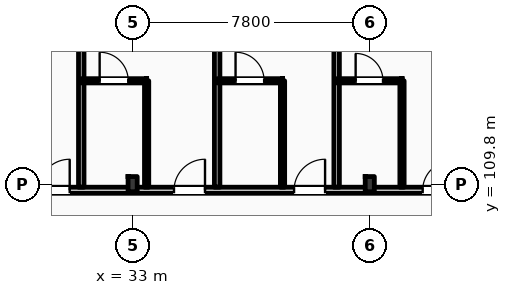
"""IFC4 building model, lengths in metres.
Left out: names, types, materials, properties, quantities, classifications, styles, units other than length and angle.
Written with IfcOpenShell. Run it as: python <this file> out.ifc"""

import sys

from ifc_helpers import new_model, si_unit, direction, frame, frame_2d, origin, origin_2d, place, context, subcontext, project, spatial, rectangle, i_section, extrude, element, fill, save


model = new_model("IFC4")
c1 = context("Model", 3, precision=1e-05, world=origin(), true_north=direction((0.0, 1.0)))
c2 = subcontext(c1, "Body", "Model", "MODEL_VIEW")
j1 = project(units=[si_unit("LENGTHUNIT", "METRE"), si_unit("PLANEANGLEUNIT", "RADIAN")], contexts=[c1])
p1 = place(None, origin())
s1 = spatial("IfcSite", under=j1, at=p1, CompositionType="ELEMENT")
p2 = place(p1, origin())
s2 = spatial("IfcBuilding", under=s1, at=p2, CompositionType="ELEMENT")
p3 = place(p2, frame((0.0, 0.0, 24.6)))
s3 = spatial("IfcBuildingStorey", under=s2, at=p3, CompositionType="ELEMENT", Elevation=24.6)
for number, where, z_axis, x_axis in (
    (1, (33.0, 109.8, 0.0), (0.0, 0.0, 1.0), (1.0, 0.0, 0.0)),
    (2, (40.8, 109.8, 0.0), (0.0, 0.0, 1.0), (1.0, 0.0, 0.0)),
):
    element("IfcColumn", number, at=place(p3, frame(where, z_axis=z_axis, x_axis=x_axis)), inside=s3, PredefinedType="COLUMN", context=c2, shape_type="SweptSolid", body=[
        extrude(i_section(OverallWidth=0.3, OverallDepth=0.5, WebThickness=0.014, FlangeThickness=0.028, FilletRadius=0.027, at=origin_2d()), origin(), (0.0, 0.0, 1.0), 3.6),
    ])
p4 = place(p3, frame((10.65, 109.6, 0.0), z_axis=(0.0, 0.0, 1.0), x_axis=(1.0, 0.0, 0.0)))
e3 = element("IfcWall", 3, at=p4, inside=s3, PredefinedType="PARTITIONING", context=c2, shape_type="SweptSolid", body=[
    extrude(rectangle(XDim=109.21, YDim=0.2, at=frame_2d((54.605, 0.0))), origin(), (0.0, 0.0, 1.0), 2.78),
])
p5 = place(p4, frame((12.705, 0.0, 0.0)))
e4 = element("IfcOpeningElement", 4, at=p5, cuts=e3, PredefinedType="OPENING", context=c2, shape_type="SweptSolid", body=[
    extrude(rectangle(XDim=1.02, YDim=2.2, at=frame_2d((0.51, 1.1))), frame((0.0, 0.11, 0.0), z_axis=(0.0, -1.0, 0.0), x_axis=(1.0, 0.0, 0.0)), (0.0, 0.0, 1.0), 0.22),
])
p6 = place(p4, frame((19.26, 0.0, 0.0)))
e5 = element("IfcOpeningElement", 5, at=p6, cuts=e3, PredefinedType="OPENING", context=c2, shape_type="SweptSolid", body=[
    extrude(rectangle(XDim=1.02, YDim=2.2, at=frame_2d((0.51, 1.1))), frame((0.0, 0.11, 0.0), z_axis=(0.0, -1.0, 0.0), x_axis=(1.0, 0.0, 0.0)), (0.0, 0.0, 1.0), 0.22),
])
p7 = place(p4, frame((23.71, 0.0, 0.0)))
e6 = element("IfcOpeningElement", 6, at=p7, cuts=e3, PredefinedType="OPENING", context=c2, shape_type="SweptSolid", body=[
    extrude(rectangle(XDim=1.02, YDim=2.2, at=frame_2d((0.51, 1.1))), frame((0.0, 0.11, 0.0), z_axis=(0.0, -1.0, 0.0), x_axis=(1.0, 0.0, 0.0)), (0.0, 0.0, 1.0), 0.22),
])
p8 = place(p4, frame((27.66, 0.0, 0.0)))
e7 = element("IfcOpeningElement", 7, at=p8, cuts=e3, PredefinedType="OPENING", context=c2, shape_type="SweptSolid", body=[
    extrude(rectangle(XDim=1.02, YDim=2.2, at=frame_2d((0.51, 1.1))), frame((0.0, 0.11, 0.0), z_axis=(0.0, -1.0, 0.0), x_axis=(1.0, 0.0, 0.0)), (0.0, 0.0, 1.0), 0.22),
])
p9 = place(p4, frame((31.89, 0.0, 0.0)))
e8 = element("IfcOpeningElement", 8, at=p9, cuts=e3, PredefinedType="OPENING", context=c2, shape_type="SweptSolid", body=[
    extrude(rectangle(XDim=0.96, YDim=2.2, at=frame_2d((0.48, 1.1))), frame((0.0, 0.11, 0.0), z_axis=(0.0, -1.0, 0.0), x_axis=(1.0, 0.0, 0.0)), (0.0, 0.0, 1.0), 0.22),
])
p10 = place(p4, frame((33.94, 0.0, 0.0)))
e9 = element("IfcOpeningElement", 9, at=p10, cuts=e3, PredefinedType="OPENING", context=c2, shape_type="SweptSolid", body=[
    extrude(rectangle(XDim=0.96, YDim=2.2, at=frame_2d((0.48, 1.1))), frame((0.0, 0.11, 0.0), z_axis=(0.0, -1.0, 0.0), x_axis=(1.0, 0.0, 0.0)), (0.0, 0.0, 1.0), 0.22),
])
p11 = place(p4, frame((40.29, 0.0, 0.0)))
e10 = element("IfcOpeningElement", 10, at=p11, cuts=e3, PredefinedType="OPENING", context=c2, shape_type="SweptSolid", body=[
    extrude(rectangle(XDim=0.96, YDim=2.2, at=frame_2d((0.48, 1.1))), frame((0.0, 0.11, 0.0), z_axis=(0.0, -1.0, 0.0), x_axis=(1.0, 0.0, 0.0)), (0.0, 0.0, 1.0), 0.22),
])
p12 = place(p4, frame((42.34, 0.0, 0.0)))
e11 = element("IfcOpeningElement", 11, at=p12, cuts=e3, PredefinedType="OPENING", context=c2, shape_type="SweptSolid", body=[
    extrude(rectangle(XDim=0.96, YDim=2.2, at=frame_2d((0.48, 1.1))), frame((0.0, 0.11, 0.0), z_axis=(0.0, -1.0, 0.0), x_axis=(1.0, 0.0, 0.0)), (0.0, 0.0, 1.0), 0.22),
])
p13 = place(p4, frame((48.69, 0.0, 0.0)))
e12 = element("IfcOpeningElement", 12, at=p13, cuts=e3, PredefinedType="OPENING", context=c2, shape_type="SweptSolid", body=[
    extrude(rectangle(XDim=0.96, YDim=2.2, at=frame_2d((0.48, 1.1))), frame((0.0, 0.11, 0.0), z_axis=(0.0, -1.0, 0.0), x_axis=(1.0, 0.0, 0.0)), (0.0, 0.0, 1.0), 0.22),
])
p14 = place(p4, frame((50.74, 0.0, 0.0)))
e13 = element("IfcOpeningElement", 13, at=p14, cuts=e3, PredefinedType="OPENING", context=c2, shape_type="SweptSolid", body=[
    extrude(rectangle(XDim=0.96, YDim=2.2, at=frame_2d((0.48, 1.1))), frame((0.0, 0.11, 0.0), z_axis=(0.0, -1.0, 0.0), x_axis=(1.0, 0.0, 0.0)), (0.0, 0.0, 1.0), 0.22),
])
p15 = place(p4, frame((57.09, 0.0, 0.0)))
e14 = element("IfcOpeningElement", 14, at=p15, cuts=e3, PredefinedType="OPENING", context=c2, shape_type="SweptSolid", body=[
    extrude(rectangle(XDim=0.96, YDim=2.2, at=frame_2d((0.48, 1.1))), frame((0.0, 0.11, 0.0), z_axis=(0.0, -1.0, 0.0), x_axis=(1.0, 0.0, 0.0)), (0.0, 0.0, 1.0), 0.22),
])
p16 = place(p4, frame((59.14, 0.0, 0.0)))
e15 = element("IfcOpeningElement", 15, at=p16, cuts=e3, PredefinedType="OPENING", context=c2, shape_type="SweptSolid", body=[
    extrude(rectangle(XDim=0.96, YDim=2.2, at=frame_2d((0.48, 1.1))), frame((0.0, 0.11, 0.0), z_axis=(0.0, -1.0, 0.0), x_axis=(1.0, 0.0, 0.0)), (0.0, 0.0, 1.0), 0.22),
])
p17 = place(p4, frame((65.49, 0.0, 0.0)))
e16 = element("IfcOpeningElement", 16, at=p17, cuts=e3, PredefinedType="OPENING", context=c2, shape_type="SweptSolid", body=[
    extrude(rectangle(XDim=0.96, YDim=2.2, at=frame_2d((0.48, 1.1))), frame((0.0, 0.11, 0.0), z_axis=(0.0, -1.0, 0.0), x_axis=(1.0, 0.0, 0.0)), (0.0, 0.0, 1.0), 0.22),
])
p18 = place(p4, frame((67.54, 0.0, 0.0)))
e17 = element("IfcOpeningElement", 17, at=p18, cuts=e3, PredefinedType="OPENING", context=c2, shape_type="SweptSolid", body=[
    extrude(rectangle(XDim=0.96, YDim=2.2, at=frame_2d((0.48, 1.1))), frame((0.0, 0.11, 0.0), z_axis=(0.0, -1.0, 0.0), x_axis=(1.0, 0.0, 0.0)), (0.0, 0.0, 1.0), 0.22),
])
p19 = place(p4, frame((73.89, 0.0, 0.0)))
e18 = element("IfcOpeningElement", 18, at=p19, cuts=e3, PredefinedType="OPENING", context=c2, shape_type="SweptSolid", body=[
    extrude(rectangle(XDim=0.96, YDim=2.2, at=frame_2d((0.48, 1.1))), frame((0.0, 0.11, 0.0), z_axis=(0.0, -1.0, 0.0), x_axis=(1.0, 0.0, 0.0)), (0.0, 0.0, 1.0), 0.22),
])
p20 = place(p4, frame((78.09, 0.0, 0.0)))
e19 = element("IfcOpeningElement", 19, at=p20, cuts=e3, PredefinedType="OPENING", context=c2, shape_type="SweptSolid", body=[
    extrude(rectangle(XDim=0.96, YDim=2.2, at=frame_2d((0.48, 1.1))), frame((0.0, 0.11, 0.0), z_axis=(0.0, -1.0, 0.0), x_axis=(1.0, 0.0, 0.0)), (0.0, 0.0, 1.0), 0.22),
])
p21 = place(p4, frame((82.29, 0.0, 0.0)))
e20 = element("IfcOpeningElement", 20, at=p21, cuts=e3, PredefinedType="OPENING", context=c2, shape_type="SweptSolid", body=[
    extrude(rectangle(XDim=0.96, YDim=2.2, at=frame_2d((0.48, 1.1))), frame((0.0, 0.11, 0.0), z_axis=(0.0, -1.0, 0.0), x_axis=(1.0, 0.0, 0.0)), (0.0, 0.0, 1.0), 0.22),
])
p22 = place(p4, frame((86.49, 0.0, 0.0)))
e21 = element("IfcOpeningElement", 21, at=p22, cuts=e3, PredefinedType="OPENING", context=c2, shape_type="SweptSolid", body=[
    extrude(rectangle(XDim=0.96, YDim=2.2, at=frame_2d((0.48, 1.1))), frame((0.0, 0.11, 0.0), z_axis=(0.0, -1.0, 0.0), x_axis=(1.0, 0.0, 0.0)), (0.0, 0.0, 1.0), 0.22),
])
p23 = place(p4, frame((88.54, 0.0, 0.0)))
e22 = element("IfcOpeningElement", 22, at=p23, cuts=e3, PredefinedType="OPENING", context=c2, shape_type="SweptSolid", body=[
    extrude(rectangle(XDim=0.96, YDim=2.2, at=frame_2d((0.48, 1.1))), frame((0.0, 0.11, 0.0), z_axis=(0.0, -1.0, 0.0), x_axis=(1.0, 0.0, 0.0)), (0.0, 0.0, 1.0), 0.22),
])
p24 = place(p4, frame((94.89, 0.0, 0.0)))
e23 = element("IfcOpeningElement", 23, at=p24, cuts=e3, PredefinedType="OPENING", context=c2, shape_type="SweptSolid", body=[
    extrude(rectangle(XDim=0.96, YDim=2.2, at=frame_2d((0.48, 1.1))), frame((0.0, 0.11, 0.0), z_axis=(0.0, -1.0, 0.0), x_axis=(1.0, 0.0, 0.0)), (0.0, 0.0, 1.0), 0.22),
])
p25 = place(p4, frame((96.94, 0.0, 0.0)))
e24 = element("IfcOpeningElement", 24, at=p25, cuts=e3, PredefinedType="OPENING", context=c2, shape_type="SweptSolid", body=[
    extrude(rectangle(XDim=0.96, YDim=2.2, at=frame_2d((0.48, 1.1))), frame((0.0, 0.11, 0.0), z_axis=(0.0, -1.0, 0.0), x_axis=(1.0, 0.0, 0.0)), (0.0, 0.0, 1.0), 0.22),
])
p26 = place(p4, frame((103.29, 0.0, 0.0)))
e25 = element("IfcOpeningElement", 25, at=p26, cuts=e3, PredefinedType="OPENING", context=c2, shape_type="SweptSolid", body=[
    extrude(rectangle(XDim=0.96, YDim=2.2, at=frame_2d((0.48, 1.1))), frame((0.0, 0.11, 0.0), z_axis=(0.0, -1.0, 0.0), x_axis=(1.0, 0.0, 0.0)), (0.0, 0.0, 1.0), 0.22),
])
p27 = place(p4, frame((105.25, 0.0, 0.0)))
e26 = element("IfcOpeningElement", 26, at=p27, cuts=e3, PredefinedType="OPENING", context=c2, shape_type="SweptSolid", body=[
    extrude(rectangle(XDim=0.96, YDim=2.2, at=frame_2d((0.48, 1.1))), frame((0.0, 0.11, 0.0), z_axis=(0.0, -1.0, 0.0), x_axis=(1.0, 0.0, 0.0)), (0.0, 0.0, 1.0), 0.22),
])
p28 = place(p4, frame((2.716, 0.0, 0.0)))
e27 = element("IfcOpeningElement", 27, at=p28, cuts=e3, PredefinedType="OPENING", context=c2, shape_type="SweptSolid", body=[
    extrude(rectangle(XDim=1.35, YDim=2.25, at=frame_2d((0.675, 1.125))), frame((0.0, 0.11, 0.0), z_axis=(0.0, -1.0, 0.0), x_axis=(1.0, 0.0, 0.0)), (0.0, 0.0, 1.0), 0.22),
])
p29 = place(p4, frame((6.65, 0.0, 0.0)))
e28 = element("IfcOpeningElement", 28, at=p29, cuts=e3, PredefinedType="OPENING", context=c2, shape_type="SweptSolid", body=[
    extrude(rectangle(XDim=1.35, YDim=2.25, at=frame_2d((0.675, 1.125))), frame((0.0, 0.11, 0.0), z_axis=(0.0, -1.0, 0.0), x_axis=(1.0, 0.0, 0.0)), (0.0, 0.0, 1.0), 0.22),
])
p30 = place(p4, frame((10.583, 0.0, 0.0)))
e29 = element("IfcOpeningElement", 29, at=p30, cuts=e3, PredefinedType="OPENING", context=c2, shape_type="SweptSolid", body=[
    extrude(rectangle(XDim=1.35, YDim=2.25, at=frame_2d((0.675, 1.125))), frame((0.0, 0.11, 0.0), z_axis=(0.0, -1.0, 0.0), x_axis=(1.0, 0.0, 0.0)), (0.0, 0.0, 1.0), 0.22),
])
p31 = place(p3, frame((31.31, 109.7, 0.0), z_axis=(0.0, 0.0, 1.0), x_axis=(0.0, 1.0, 0.0)))
e30 = element("IfcWall", 30, at=p31, inside=s3, PredefinedType="PARTITIONING", context=c2, shape_type="SweptSolid", body=[
    extrude(rectangle(XDim=8.15, YDim=0.18, at=frame_2d((4.075, 0.0))), origin(), (0.0, 0.0, 1.0), 3.34),
])
p32 = place(p3, frame((35.78, 109.7, 0.0), z_axis=(0.0, 0.0, 1.0), x_axis=(0.0, 1.0, 0.0)))
e31 = element("IfcWall", 31, at=p32, inside=s3, PredefinedType="PARTITIONING", context=c2, shape_type="SweptSolid", body=[
    extrude(rectangle(XDim=8.15, YDim=0.18, at=frame_2d((4.075, 0.0))), origin(), (0.0, 0.0, 1.0), 3.03),
])
p33 = place(p3, frame((33.46, 109.7, 0.0), z_axis=(0.0, 0.0, 1.0), x_axis=(0.0, 1.0, 0.0)))
e32 = element("IfcWall", 32, at=p33, inside=s3, PredefinedType="PARTITIONING", context=c2, shape_type="SweptSolid", body=[
    extrude(rectangle(XDim=3.5, YDim=0.14, at=frame_2d((1.75, 0.0))), origin(), (0.0, 0.0, 1.0), 3.34),
])
p34 = place(p3, frame((31.31, 113.2, 0.0), z_axis=(0.0, 0.0, 1.0), x_axis=(1.0, 0.0, 0.0)))
e33 = element("IfcWall", 33, at=p34, inside=s3, PredefinedType="PARTITIONING", context=c2, shape_type="SweptSolid", body=[
    extrude(rectangle(XDim=2.15, YDim=0.14, at=frame_2d((1.075, 0.0))), origin(), (0.0, 0.0, 1.0), 3.34),
])
p35 = place(p34, frame((0.605, 0.0, 0.0)))
e34 = element("IfcOpeningElement", 34, at=p35, cuts=e33, PredefinedType="OPENING", context=c2, shape_type="SweptSolid", body=[
    extrude(rectangle(XDim=0.94, YDim=2.15, at=frame_2d((0.47, 1.075))), frame((0.0, 0.08, 0.0), z_axis=(0.0, -1.0, 0.0), x_axis=(1.0, 0.0, 0.0)), (0.0, 0.0, 1.0), 0.16),
])
p36 = place(p3, frame((39.71, 109.7, 0.0), z_axis=(0.0, 0.0, 1.0), x_axis=(0.0, 1.0, 0.0)))
e35 = element("IfcWall", 35, at=p36, inside=s3, PredefinedType="PARTITIONING", context=c2, shape_type="SweptSolid", body=[
    extrude(rectangle(XDim=8.15, YDim=0.18, at=frame_2d((4.075, 0.0))), origin(), (0.0, 0.0, 1.0), 3.34),
])
p37 = place(p3, frame((37.93, 109.7, 0.0), z_axis=(0.0, 0.0, 1.0), x_axis=(0.0, 1.0, 0.0)))
e36 = element("IfcWall", 36, at=p37, inside=s3, PredefinedType="PARTITIONING", context=c2, shape_type="SweptSolid", body=[
    extrude(rectangle(XDim=3.5, YDim=0.14, at=frame_2d((1.75, 0.0))), origin(), (0.0, 0.0, 1.0), 3.34),
])
p38 = place(p3, frame((35.78, 113.2, 0.0), z_axis=(0.0, 0.0, 1.0), x_axis=(1.0, 0.0, 0.0)))
e37 = element("IfcWall", 37, at=p38, inside=s3, PredefinedType="PARTITIONING", context=c2, shape_type="SweptSolid", body=[
    extrude(rectangle(XDim=2.15, YDim=0.14, at=frame_2d((1.075, 0.0))), origin(), (0.0, 0.0, 1.0), 3.34),
])
p39 = place(p38, frame((0.605, 0.0, 0.0)))
e38 = element("IfcOpeningElement", 38, at=p39, cuts=e37, PredefinedType="OPENING", context=c2, shape_type="SweptSolid", body=[
    extrude(rectangle(XDim=0.94, YDim=2.15, at=frame_2d((0.47, 1.075))), frame((0.0, 0.08, 0.0), z_axis=(0.0, -1.0, 0.0), x_axis=(1.0, 0.0, 0.0)), (0.0, 0.0, 1.0), 0.16),
])
p40 = place(p3, frame((41.86, 109.7, 0.0), z_axis=(0.0, 0.0, 1.0), x_axis=(0.0, 1.0, 0.0)))
e39 = element("IfcWall", 39, at=p40, inside=s3, PredefinedType="PARTITIONING", context=c2, shape_type="SweptSolid", body=[
    extrude(rectangle(XDim=3.5, YDim=0.14, at=frame_2d((1.75, 0.0))), origin(), (0.0, 0.0, 1.0), 3.34),
])
p41 = place(p3, frame((39.71, 113.2, 0.0), z_axis=(0.0, 0.0, 1.0), x_axis=(1.0, 0.0, 0.0)))
e40 = element("IfcWall", 40, at=p41, inside=s3, PredefinedType="PARTITIONING", context=c2, shape_type="SweptSolid", body=[
    extrude(rectangle(XDim=2.15, YDim=0.14, at=frame_2d((1.075, 0.0))), origin(), (0.0, 0.0, 1.0), 3.34),
])
p42 = place(p41, frame((0.625, 0.0, 0.0)))
e41 = element("IfcOpeningElement", 41, at=p42, cuts=e40, PredefinedType="OPENING", context=c2, shape_type="SweptSolid", body=[
    extrude(rectangle(XDim=0.9, YDim=2.1, at=frame_2d((0.45, 1.05))), frame((0.0, 0.08, 0.0), z_axis=(0.0, -1.0, 0.0), x_axis=(1.0, 0.0, 0.0)), (0.0, 0.0, 1.0), 0.16),
])
p43 = place(p6, origin())
e42 = element("IfcDoor", 42, at=p43, inside=s3, OperationType="SINGLE_SWING_RIGHT", PredefinedType="DOOR", context=c2, shape_type="SweptSolid", body=[
    extrude(rectangle(XDim=1.02, YDim=2.2, at=frame_2d((0.51, 1.1))), frame((0.0, 0.025, 0.0), z_axis=(0.0, -1.0, 0.0), x_axis=(1.0, 0.0, 0.0)), (0.0, 0.0, 1.0), 0.05),
])
fill(e5, e42)
p44 = place(p7, origin())
e43 = element("IfcDoor", 43, at=p44, inside=s3, OperationType="SINGLE_SWING_RIGHT", PredefinedType="DOOR", context=c2, shape_type="SweptSolid", body=[
    extrude(rectangle(XDim=1.02, YDim=2.2, at=frame_2d((0.51, 1.1))), frame((0.0, 0.025, 0.0), z_axis=(0.0, -1.0, 0.0), x_axis=(1.0, 0.0, 0.0)), (0.0, 0.0, 1.0), 0.05),
])
fill(e6, e43)
p45 = place(p35, origin())
e44 = element("IfcDoor", 44, at=p45, inside=s3, OperationType="SINGLE_SWING_LEFT", PredefinedType="DOOR", context=c2, shape_type="SweptSolid", body=[
    extrude(rectangle(XDim=0.94, YDim=2.15, at=frame_2d((0.47, 1.075))), frame((0.0, 0.025, 0.0), z_axis=(0.0, -1.0, 0.0), x_axis=(1.0, 0.0, 0.0)), (0.0, 0.0, 1.0), 0.05),
])
fill(e34, e44)
p46 = place(p8, origin())
e45 = element("IfcDoor", 45, at=p46, inside=s3, OperationType="SINGLE_SWING_RIGHT", PredefinedType="DOOR", context=c2, shape_type="SweptSolid", body=[
    extrude(rectangle(XDim=1.02, YDim=2.2, at=frame_2d((0.51, 1.1))), frame((0.0, 0.025, 0.0), z_axis=(0.0, -1.0, 0.0), x_axis=(1.0, 0.0, 0.0)), (0.0, 0.0, 1.0), 0.05),
])
fill(e7, e45)
p47 = place(p39, origin())
e46 = element("IfcDoor", 46, at=p47, inside=s3, OperationType="SINGLE_SWING_LEFT", PredefinedType="DOOR", context=c2, shape_type="SweptSolid", body=[
    extrude(rectangle(XDim=0.94, YDim=2.15, at=frame_2d((0.47, 1.075))), frame((0.0, 0.025, 0.0), z_axis=(0.0, -1.0, 0.0), x_axis=(1.0, 0.0, 0.0)), (0.0, 0.0, 1.0), 0.05),
])
fill(e38, e46)
p48 = place(p9, origin())
e47 = element("IfcDoor", 47, at=p48, inside=s3, OperationType="SINGLE_SWING_RIGHT", PredefinedType="DOOR", context=c2, shape_type="SweptSolid", body=[
    extrude(rectangle(XDim=0.96, YDim=2.2, at=frame_2d((0.48, 1.1))), frame((0.0, 0.025, 0.0), z_axis=(0.0, -1.0, 0.0), x_axis=(1.0, 0.0, 0.0)), (0.0, 0.0, 1.0), 0.05),
])
fill(e8, e47)
p49 = place(p42, origin())
e48 = element("IfcDoor", 48, at=p49, inside=s3, OperationType="SINGLE_SWING_LEFT", PredefinedType="DOOR", context=c2, shape_type="SweptSolid", body=[
    extrude(rectangle(XDim=0.9, YDim=2.1, at=frame_2d((0.45, 1.05))), frame((0.0, 0.025, 0.0), z_axis=(0.0, -1.0, 0.0), x_axis=(1.0, 0.0, 0.0)), (0.0, 0.0, 1.0), 0.05),
])
fill(e41, e48)
save(model, sys.argv[1])
